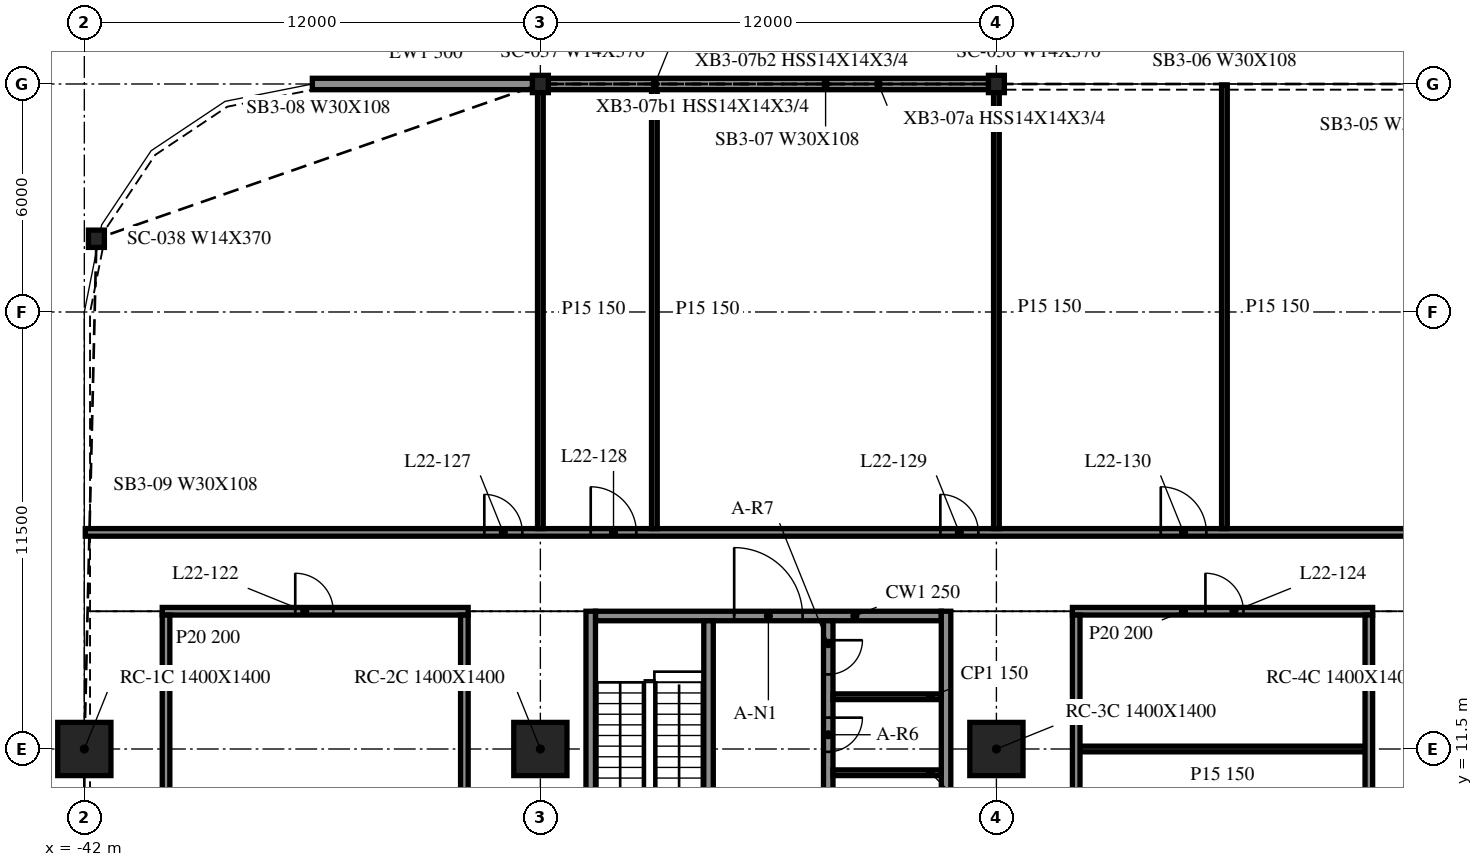
"""IFC4 building model, lengths in metres.
Left out: names, types, materials, properties, quantities, classifications, styles, units other than length and angle.
Written with IfcOpenShell. Run it as: python <this file> out.ifc"""

import sys

from ifc_helpers import new_model, si_unit, direction, frame, frame_2d, origin, origin_2d, place, context, subcontext, project, spatial, rectangle, i_section, extrude, element, fill, save


model = new_model("IFC4")
c1 = context("Model", 3, precision=1e-05, world=origin(), true_north=direction((0.0, 1.0)))
c2 = subcontext(c1, "Body", "Model", "MODEL_VIEW")
j1 = project(units=[si_unit("LENGTHUNIT", "METRE"), si_unit("PLANEANGLEUNIT", "RADIAN")], contexts=[c1])
p1 = place(None, origin())
s1 = spatial("IfcSite", under=j1, at=p1, CompositionType="ELEMENT")
p2 = place(p1, origin())
s2 = spatial("IfcBuilding", under=s1, at=p2, CompositionType="ELEMENT")
p3 = place(p2, frame((0.0, 0.0, 97.1)))
s3 = spatial("IfcBuildingStorey", under=s2, at=p3, CompositionType="ELEMENT", Elevation=97.1)
for number, where, z_axis, x_axis in (
    (1, (-42.0, 11.5, -0.34), (0.0, 0.0, 1.0), (1.0, 0.0, 0.0)),
    (2, (-30.0, 11.5, -0.34), (0.0, 0.0, 1.0), (1.0, 0.0, 0.0)),
    (3, (-18.0, 11.5, -0.34), (0.0, 0.0, 1.0), (1.0, 0.0, 0.0)),
):
    element("IfcColumn", number, at=place(p3, frame(where, z_axis=z_axis, x_axis=x_axis)), inside=s3, PredefinedType="COLUMN", context=c2, shape_type="SweptSolid", body=[
        extrude(rectangle(XDim=1.4, YDim=1.4, at=origin_2d()), origin(), (0.0, 0.0, 1.0), 4.1),
    ])
for number, where, z_axis, x_axis in (
    (4, (-18.0, 29.0, -0.34), (0.0, 0.0, 1.0), (1.0, 0.0, 0.0)),
    (5, (-30.0, 29.0, -0.34), (0.0, 0.0, 1.0), (1.0, 0.0, 0.0)),
    (6, (-41.682, 24.927, -0.34), (0.0, 0.0, 1.0), (1.0, 0.0, 0.0)),
):
    element("IfcColumn", number, at=place(p3, frame(where, z_axis=z_axis, x_axis=x_axis)), inside=s3, PredefinedType="COLUMN", context=c2, shape_type="SweptSolid", body=[
        extrude(i_section(OverallWidth=0.419, OverallDepth=0.455, WebThickness=0.042, FlangeThickness=0.068, at=origin_2d()), origin(), (0.0, 0.0, 1.0), 4.1),
    ])
p4 = place(p3, frame((-18.021, 29.0, 0.0), z_axis=(0.0, 0.0, 1.0), x_axis=(-1.0, 0.0, 0.0)))
e7 = element("IfcWall", 7, at=p4, inside=s3, PredefinedType="NOTDEFINED", context=c2, shape_type="SweptSolid", body=[
    extrude(rectangle(XDim=11.958, YDim=0.3, at=frame_2d((5.979, 0.0))), origin(), (0.0, 0.0, 1.0), 3.003),
])
p5 = place(p3, frame((-30.021, 29.0, 0.0), z_axis=(0.0, 0.0, 1.0), x_axis=(-1.0, 0.0, 0.0)))
e8 = element("IfcWall", 8, at=p5, inside=s3, PredefinedType="NOTDEFINED", context=c2, shape_type="SweptSolid", body=[
    extrude(rectangle(XDim=5.979, YDim=0.3, at=frame_2d((2.99, 0.0))), origin(), (0.0, 0.0, 1.0), 3.003),
])
for number, where, z_axis, x_axis in (
    (9, (-28.675, 15.125, 0.0), (0.0, 0.0, 1.0), (0.0, -1.0, 0.0)),
    (10, (-19.325, -9.125, 0.0), (0.0, 0.0, 1.0), (0.0, 1.0, 0.0)),
):
    element("IfcWall", number, at=place(p3, frame(where, z_axis=z_axis, x_axis=x_axis)), inside=s3, PredefinedType="SOLIDWALL", context=c2, shape_type="SweptSolid", body=[
        extrude(rectangle(XDim=24.25, YDim=0.25, at=frame_2d((12.125, 0.0))), origin(), (0.0, 0.0, 1.0), 3.76),
    ])
p6 = place(p3, frame((-28.55, 15.0, 0.0), z_axis=(0.0, 0.0, 1.0), x_axis=(1.0, 0.0, 0.0)))
e11 = element("IfcWall", 11, at=p6, inside=s3, PredefinedType="SOLIDWALL", context=c2, shape_type="SweptSolid", body=[
    extrude(rectangle(XDim=9.1, YDim=0.25, at=frame_2d((4.55, 0.0))), origin(), (0.0, 0.0, 1.0), 3.76),
])
p7 = place(p6, frame((3.65, 0.0, 0.0)))
e12 = element("IfcOpeningElement", 12, at=p7, cuts=e11, PredefinedType="OPENING", context=c2, shape_type="SweptSolid", body=[
    extrude(rectangle(XDim=1.8, YDim=2.1, at=frame_2d((0.9, 1.05))), frame((0.0, 0.135, 0.0), z_axis=(0.0, -1.0, 0.0), x_axis=(1.0, 0.0, 0.0)), (0.0, 0.0, 1.0), 0.27),
])
p8 = place(p3, frame((-25.575, 14.875, 0.0), z_axis=(0.0, 0.0, 1.0), x_axis=(0.0, -1.0, 0.0)))
e13 = element("IfcWall", 13, at=p8, inside=s3, PredefinedType="SOLIDWALL", context=c2, shape_type="SweptSolid", body=[
    extrude(rectangle(XDim=6.25, YDim=0.25, at=frame_2d((3.125, 0.0))), origin(), (0.0, 0.0, 1.0), 3.76),
])
p9 = place(p8, frame((4.85, 0.0, 0.0)))
e14 = element("IfcOpeningElement", 14, at=p9, cuts=e13, PredefinedType="OPENING", context=c2, shape_type="SweptSolid", body=[
    extrude(rectangle(XDim=1.0, YDim=2.1, at=frame_2d((0.5, 1.05))), frame((0.0, 0.135, 0.0), z_axis=(0.0, -1.0, 0.0), x_axis=(1.0, 0.0, 0.0)), (0.0, 0.0, 1.0), 0.27),
])
p10 = place(p3, frame((-22.425, 14.875, 0.0), z_axis=(0.0, 0.0, 1.0), x_axis=(0.0, -1.0, 0.0)))
e15 = element("IfcWall", 15, at=p10, inside=s3, PredefinedType="SOLIDWALL", context=c2, shape_type="SweptSolid", body=[
    extrude(rectangle(XDim=23.75, YDim=0.25, at=frame_2d((11.875, 0.0))), origin(), (0.0, 0.0, 1.0), 3.76),
])
p11 = place(p10, frame((15.45, 0.0, 0.0)))
e16 = element("IfcOpeningElement", 16, at=p11, cuts=e15, PredefinedType="OPENING", context=c2, shape_type="SweptSolid", body=[
    extrude(rectangle(XDim=1.1, YDim=2.1, at=frame_2d((0.55, 1.05))), frame((0.0, 0.135, 0.0), z_axis=(0.0, -1.0, 0.0), x_axis=(1.0, 0.0, 0.0)), (0.0, 0.0, 1.0), 0.27),
])
p12 = place(p10, frame((12.7, 0.0, 0.0)))
e17 = element("IfcOpeningElement", 17, at=p12, cuts=e15, PredefinedType="OPENING", context=c2, shape_type="SweptSolid", body=[
    extrude(rectangle(XDim=1.1, YDim=2.1, at=frame_2d((0.55, 1.05))), frame((0.0, 0.135, 0.0), z_axis=(0.0, -1.0, 0.0), x_axis=(1.0, 0.0, 0.0)), (0.0, 0.0, 1.0), 0.27),
])
p13 = place(p10, frame((21.837, 0.0, 0.0)))
e18 = element("IfcOpeningElement", 18, at=p13, cuts=e15, PredefinedType="OPENING", context=c2, shape_type="SweptSolid", body=[
    extrude(rectangle(XDim=0.9, YDim=2.1, at=frame_2d((0.45, 1.05))), frame((0.0, 0.135, 0.0), z_axis=(0.0, -1.0, 0.0), x_axis=(1.0, 0.0, 0.0)), (0.0, 0.0, 1.0), 0.27),
])
p14 = place(p10, frame((18.762, 0.0, 0.0)))
e19 = element("IfcOpeningElement", 19, at=p14, cuts=e15, PredefinedType="OPENING", context=c2, shape_type="SweptSolid", body=[
    extrude(rectangle(XDim=0.9, YDim=2.1, at=frame_2d((0.45, 1.05))), frame((0.0, 0.135, 0.0), z_axis=(0.0, -1.0, 0.0), x_axis=(1.0, 0.0, 0.0)), (0.0, 0.0, 1.0), 0.27),
])
p15 = place(p10, frame((4.587, 0.0, 0.0)))
e20 = element("IfcOpeningElement", 20, at=p15, cuts=e15, PredefinedType="OPENING", context=c2, shape_type="SweptSolid", body=[
    extrude(rectangle(XDim=0.9, YDim=2.1, at=frame_2d((0.45, 1.05))), frame((0.0, 0.135, 0.0), z_axis=(0.0, -1.0, 0.0), x_axis=(1.0, 0.0, 0.0)), (0.0, 0.0, 1.0), 0.27),
])
p16 = place(p10, frame((2.55, 0.0, 0.0)))
e21 = element("IfcOpeningElement", 21, at=p16, cuts=e15, PredefinedType="OPENING", context=c2, shape_type="SweptSolid", body=[
    extrude(rectangle(XDim=0.9, YDim=2.1, at=frame_2d((0.45, 1.05))), frame((0.0, 0.135, 0.0), z_axis=(0.0, -1.0, 0.0), x_axis=(1.0, 0.0, 0.0)), (0.0, 0.0, 1.0), 0.27),
])
p17 = place(p10, frame((0.512, 0.0, 0.0)))
e22 = element("IfcOpeningElement", 22, at=p17, cuts=e15, PredefinedType="OPENING", context=c2, shape_type="SweptSolid", body=[
    extrude(rectangle(XDim=0.9, YDim=2.1, at=frame_2d((0.45, 1.05))), frame((0.0, 0.135, 0.0), z_axis=(0.0, -1.0, 0.0), x_axis=(1.0, 0.0, 0.0)), (0.0, 0.0, 1.0), 0.27),
])
for number, where, z_axis, x_axis in (
    (23, (-22.3, 10.875, 0.0), (0.0, 0.0, 1.0), (1.0, 0.0, 0.0)),
    (24, (-22.3, 12.875, 0.0), (0.0, 0.0, 1.0), (1.0, 0.0, 0.0)),
):
    element("IfcWall", number, at=place(p3, frame(where, z_axis=z_axis, x_axis=x_axis)), inside=s3, PredefinedType="PARTITIONING", context=c2, shape_type="SweptSolid", body=[
        extrude(rectangle(XDim=2.85, YDim=0.15, at=frame_2d((1.425, 0.0))), origin(), (0.0, 0.0, 1.0), 3.76),
    ])
p18 = place(p3, frame((-15.8, 11.5, 0.0), z_axis=(0.0, 0.0, 1.0), x_axis=(1.0, 0.0, 0.0)))
e25 = element("IfcWall", 25, at=p18, inside=s3, PredefinedType="PARTITIONING", context=c2, shape_type="SweptSolid", body=[
    extrude(rectangle(XDim=7.5, YDim=0.15, at=frame_2d((3.75, 0.0))), origin(), (0.0, 0.0, 1.0), 3.76),
])
p19 = place(p3, frame((-39.95, 15.125, 0.0), z_axis=(0.0, 0.0, 1.0), x_axis=(1.0, 0.0, 0.0)))
e26 = element("IfcWall", 26, at=p19, inside=s3, PredefinedType="PARTITIONING", context=c2, shape_type="SweptSolid", body=[
    extrude(rectangle(XDim=8.05, YDim=0.2, at=frame_2d((4.025, 0.0))), origin(), (0.0, 0.0, 1.0), 3.76),
])
p20 = place(p19, frame((3.5, 0.0, 0.0)))
e27 = element("IfcOpeningElement", 27, at=p20, cuts=e26, PredefinedType="OPENING", context=c2, shape_type="SweptSolid", body=[
    extrude(rectangle(XDim=1.0, YDim=2.1, at=frame_2d((0.5, 1.05))), frame((0.0, 0.11, 0.0), z_axis=(0.0, -1.0, 0.0), x_axis=(1.0, 0.0, 0.0)), (0.0, 0.0, 1.0), 0.22),
])
p21 = place(p3, frame((-16.0, 15.125, 0.0), z_axis=(0.0, 0.0, 1.0), x_axis=(1.0, 0.0, 0.0)))
e28 = element("IfcWall", 28, at=p21, inside=s3, PredefinedType="PARTITIONING", context=c2, shape_type="SweptSolid", body=[
    extrude(rectangle(XDim=7.9, YDim=0.2, at=frame_2d((3.95, 0.0))), origin(), (0.0, 0.0, 1.0), 3.76),
])
p22 = place(p21, frame((3.5, 0.0, 0.0)))
e29 = element("IfcOpeningElement", 29, at=p22, cuts=e28, PredefinedType="OPENING", context=c2, shape_type="SweptSolid", body=[
    extrude(rectangle(XDim=1.0, YDim=2.1, at=frame_2d((0.5, 1.05))), frame((0.0, 0.11, 0.0), z_axis=(0.0, -1.0, 0.0), x_axis=(1.0, 0.0, 0.0)), (0.0, 0.0, 1.0), 0.22),
])
p23 = place(p3, frame((-41.975, 17.2, 0.0), z_axis=(0.0, 0.0, 1.0), x_axis=(1.0, 0.0, 0.0)))
e30 = element("IfcWall", 30, at=p23, inside=s3, PredefinedType="PARTITIONING", context=c2, shape_type="SweptSolid", body=[
    extrude(rectangle(XDim=95.95, YDim=0.2, at=frame_2d((47.975, 0.0))), origin(), (0.0, 0.0, 1.0), 3.76),
])
p24 = place(p23, frame((10.5, 0.0, 0.0)))
e31 = element("IfcOpeningElement", 31, at=p24, cuts=e30, PredefinedType="OPENING", context=c2, shape_type="SweptSolid", body=[
    extrude(rectangle(XDim=1.0, YDim=2.1, at=frame_2d((0.5, 1.05))), frame((0.0, 0.11, 0.0), z_axis=(0.0, -1.0, 0.0), x_axis=(1.0, 0.0, 0.0)), (0.0, 0.0, 1.0), 0.22),
])
p25 = place(p23, frame((13.3, 0.0, 0.0)))
e32 = element("IfcOpeningElement", 32, at=p25, cuts=e30, PredefinedType="OPENING", context=c2, shape_type="SweptSolid", body=[
    extrude(rectangle(XDim=1.2, YDim=2.1, at=frame_2d((0.6, 1.05))), frame((0.0, 0.11, 0.0), z_axis=(0.0, -1.0, 0.0), x_axis=(1.0, 0.0, 0.0)), (0.0, 0.0, 1.0), 0.22),
])
p26 = place(p23, frame((22.5, 0.0, 0.0)))
e33 = element("IfcOpeningElement", 33, at=p26, cuts=e30, PredefinedType="OPENING", context=c2, shape_type="SweptSolid", body=[
    extrude(rectangle(XDim=1.0, YDim=2.1, at=frame_2d((0.5, 1.05))), frame((0.0, 0.11, 0.0), z_axis=(0.0, -1.0, 0.0), x_axis=(1.0, 0.0, 0.0)), (0.0, 0.0, 1.0), 0.22),
])
p27 = place(p23, frame((28.3, 0.0, 0.0)))
e34 = element("IfcOpeningElement", 34, at=p27, cuts=e30, PredefinedType="OPENING", context=c2, shape_type="SweptSolid", body=[
    extrude(rectangle(XDim=1.2, YDim=2.1, at=frame_2d((0.6, 1.05))), frame((0.0, 0.11, 0.0), z_axis=(0.0, -1.0, 0.0), x_axis=(1.0, 0.0, 0.0)), (0.0, 0.0, 1.0), 0.22),
])
p28 = place(p23, frame((40.5, 0.0, 0.0)))
e35 = element("IfcOpeningElement", 35, at=p28, cuts=e30, PredefinedType="OPENING", context=c2, shape_type="SweptSolid", body=[
    extrude(rectangle(XDim=1.0, YDim=2.1, at=frame_2d((0.5, 1.05))), frame((0.0, 0.11, 0.0), z_axis=(0.0, -1.0, 0.0), x_axis=(1.0, 0.0, 0.0)), (0.0, 0.0, 1.0), 0.22),
])
p29 = place(p23, frame((43.3, 0.0, 0.0)))
e36 = element("IfcOpeningElement", 36, at=p29, cuts=e30, PredefinedType="OPENING", context=c2, shape_type="SweptSolid", body=[
    extrude(rectangle(XDim=1.2, YDim=2.1, at=frame_2d((0.6, 1.05))), frame((0.0, 0.11, 0.0), z_axis=(0.0, -1.0, 0.0), x_axis=(1.0, 0.0, 0.0)), (0.0, 0.0, 1.0), 0.22),
])
p30 = place(p23, frame((47.3, 0.0, 0.0)))
e37 = element("IfcOpeningElement", 37, at=p30, cuts=e30, PredefinedType="OPENING", context=c2, shape_type="SweptSolid", body=[
    extrude(rectangle(XDim=1.0, YDim=2.1, at=frame_2d((0.5, 1.05))), frame((0.0, 0.11, 0.0), z_axis=(0.0, -1.0, 0.0), x_axis=(1.0, 0.0, 0.0)), (0.0, 0.0, 1.0), 0.22),
])
p31 = place(p23, frame((54.1, 0.0, 0.0)))
e38 = element("IfcOpeningElement", 38, at=p31, cuts=e30, PredefinedType="OPENING", context=c2, shape_type="SweptSolid", body=[
    extrude(rectangle(XDim=1.2, YDim=2.1, at=frame_2d((0.6, 1.05))), frame((0.0, 0.11, 0.0), z_axis=(0.0, -1.0, 0.0), x_axis=(1.0, 0.0, 0.0)), (0.0, 0.0, 1.0), 0.22),
])
p32 = place(p23, frame((60.1, 0.0, 0.0)))
e39 = element("IfcOpeningElement", 39, at=p32, cuts=e30, PredefinedType="OPENING", context=c2, shape_type="SweptSolid", body=[
    extrude(rectangle(XDim=1.0, YDim=2.1, at=frame_2d((0.5, 1.05))), frame((0.0, 0.11, 0.0), z_axis=(0.0, -1.0, 0.0), x_axis=(1.0, 0.0, 0.0)), (0.0, 0.0, 1.0), 0.22),
])
p33 = place(p23, frame((72.1, 0.0, 0.0)))
e40 = element("IfcOpeningElement", 40, at=p33, cuts=e30, PredefinedType="OPENING", context=c2, shape_type="SweptSolid", body=[
    extrude(rectangle(XDim=1.2, YDim=2.1, at=frame_2d((0.6, 1.05))), frame((0.0, 0.11, 0.0), z_axis=(0.0, -1.0, 0.0), x_axis=(1.0, 0.0, 0.0)), (0.0, 0.0, 1.0), 0.22),
])
p34 = place(p23, frame((75.1, 0.0, 0.0)))
e41 = element("IfcOpeningElement", 41, at=p34, cuts=e30, PredefinedType="OPENING", context=c2, shape_type="SweptSolid", body=[
    extrude(rectangle(XDim=1.0, YDim=2.1, at=frame_2d((0.5, 1.05))), frame((0.0, 0.11, 0.0), z_axis=(0.0, -1.0, 0.0), x_axis=(1.0, 0.0, 0.0)), (0.0, 0.0, 1.0), 0.22),
])
p35 = place(p23, frame((84.1, 0.0, 0.0)))
e42 = element("IfcOpeningElement", 42, at=p35, cuts=e30, PredefinedType="OPENING", context=c2, shape_type="SweptSolid", body=[
    extrude(rectangle(XDim=1.2, YDim=2.1, at=frame_2d((0.6, 1.05))), frame((0.0, 0.11, 0.0), z_axis=(0.0, -1.0, 0.0), x_axis=(1.0, 0.0, 0.0)), (0.0, 0.0, 1.0), 0.22),
])
p36 = place(p23, frame((90.1, 0.0, 0.0)))
e43 = element("IfcOpeningElement", 43, at=p36, cuts=e30, PredefinedType="OPENING", context=c2, shape_type="SweptSolid", body=[
    extrude(rectangle(XDim=1.0, YDim=2.1, at=frame_2d((0.5, 1.05))), frame((0.0, 0.11, 0.0), z_axis=(0.0, -1.0, 0.0), x_axis=(1.0, 0.0, 0.0)), (0.0, 0.0, 1.0), 0.22),
])
for number, where, z_axis, x_axis in (
    (44, (-39.85, -9.025, 0.0), (0.0, 0.0, 1.0), (0.0, 1.0, 0.0)),
    (45, (-32.0, -9.025, 0.0), (0.0, 0.0, 1.0), (0.0, 1.0, 0.0)),
):
    element("IfcWall", number, at=place(p3, frame(where, z_axis=z_axis, x_axis=x_axis)), inside=s3, PredefinedType="PARTITIONING", context=c2, shape_type="SweptSolid", body=[
        extrude(rectangle(XDim=24.05, YDim=0.2, at=frame_2d((12.025, 0.0))), origin(), (0.0, 0.0, 1.0), 3.76),
    ])
for number, where, z_axis, x_axis in (
    (46, (-30.0, 17.3, 0.0), (0.0, 0.0, 1.0), (0.0, 1.0, 0.0)),
    (47, (-27.0, 17.3, 0.0), (0.0, 0.0, 1.0), (0.0, 1.0, 0.0)),
):
    element("IfcWall", number, at=place(p3, frame(where, z_axis=z_axis, x_axis=x_axis)), inside=s3, PredefinedType="PARTITIONING", context=c2, shape_type="SweptSolid", body=[
        extrude(rectangle(XDim=11.55, YDim=0.15, at=frame_2d((5.775, 0.0))), origin(), (0.0, 0.0, 1.0), 3.76),
    ])
p37 = place(p3, frame((-18.0, 17.3, 0.0), z_axis=(0.0, 0.0, 1.0), x_axis=(0.0, 1.0, 0.0)))
e48 = element("IfcWall", 48, at=p37, inside=s3, PredefinedType="PARTITIONING", context=c2, shape_type="SweptSolid", body=[
    extrude(rectangle(XDim=11.675, YDim=0.15, at=frame_2d((5.837, 0.0))), origin(), (0.0, 0.0, 1.0), 3.76),
])
p38 = place(p3, frame((-15.9, -9.025, 0.0), z_axis=(0.0, 0.0, 1.0), x_axis=(0.0, 1.0, 0.0)))
e49 = element("IfcWall", 49, at=p38, inside=s3, PredefinedType="PARTITIONING", context=c2, shape_type="SweptSolid", body=[
    extrude(rectangle(XDim=24.05, YDim=0.2, at=frame_2d((12.025, 0.0))), origin(), (0.0, 0.0, 1.0), 3.76),
])
p39 = place(p38, frame((11.5, 0.0, 0.0)))
e50 = element("IfcOpeningElement", 50, at=p39, cuts=e49, PredefinedType="OPENING", context=c2, shape_type="SweptSolid", body=[
    extrude(rectangle(XDim=0.9, YDim=2.1, at=frame_2d((0.45, 1.05))), frame((0.0, 0.11, 0.0), z_axis=(0.0, -1.0, 0.0), x_axis=(1.0, 0.0, 0.0)), (0.0, 0.0, 1.0), 0.22),
])
p40 = place(p3, frame((-12.0, 17.3, 0.0), z_axis=(0.0, 0.0, 1.0), x_axis=(0.0, 1.0, 0.0)))
e51 = element("IfcWall", 51, at=p40, inside=s3, PredefinedType="PARTITIONING", context=c2, shape_type="SweptSolid", body=[
    extrude(rectangle(XDim=11.675, YDim=0.15, at=frame_2d((5.837, 0.0))), origin(), (0.0, 0.0, 1.0), 3.76),
])
p41 = place(p3, frame((-8.2, -9.025, 0.0), z_axis=(0.0, 0.0, 1.0), x_axis=(0.0, 1.0, 0.0)))
e52 = element("IfcWall", 52, at=p41, inside=s3, PredefinedType="PARTITIONING", context=c2, shape_type="SweptSolid", body=[
    extrude(rectangle(XDim=24.05, YDim=0.2, at=frame_2d((12.025, 0.0))), origin(), (0.0, 0.0, 1.0), 3.76),
])
p42 = place(p7, origin())
e53 = element("IfcDoor", 53, at=p42, inside=s3, OperationType="DOUBLE_DOOR_SINGLE_SWING", PredefinedType="DOOR", context=c2, shape_type="SweptSolid", body=[
    extrude(rectangle(XDim=1.8, YDim=2.1, at=frame_2d((0.9, 1.05))), frame((0.0, 0.025, 0.0), z_axis=(0.0, -1.0, 0.0), x_axis=(1.0, 0.0, 0.0)), (0.0, 0.0, 1.0), 0.05),
])
fill(e12, e53)
p43 = place(p16, origin())
e54 = element("IfcDoor", 54, at=p43, inside=s3, OperationType="SINGLE_SWING_RIGHT", PredefinedType="DOOR", context=c2, shape_type="SweptSolid", body=[
    extrude(rectangle(XDim=0.9, YDim=2.1, at=frame_2d((0.45, 1.05))), frame((0.0, 0.025, 0.0), z_axis=(0.0, -1.0, 0.0), x_axis=(1.0, 0.0, 0.0)), (0.0, 0.0, 1.0), 0.05),
])
fill(e21, e54)
p44 = place(p17, origin())
e55 = element("IfcDoor", 55, at=p44, inside=s3, OperationType="SINGLE_SWING_LEFT", PredefinedType="DOOR", context=c2, shape_type="SweptSolid", body=[
    extrude(rectangle(XDim=0.9, YDim=2.1, at=frame_2d((0.45, 1.05))), frame((0.0, 0.025, 0.0), z_axis=(0.0, -1.0, 0.0), x_axis=(1.0, 0.0, 0.0)), (0.0, 0.0, 1.0), 0.05),
])
fill(e22, e55)
p45 = place(p20, origin())
e56 = element("IfcDoor", 56, at=p45, inside=s3, OperationType="SINGLE_SWING_RIGHT", PredefinedType="DOOR", context=c2, shape_type="SweptSolid", body=[
    extrude(rectangle(XDim=1.0, YDim=2.1, at=frame_2d((0.5, 1.05))), frame((0.0, 0.025, 0.0), z_axis=(0.0, -1.0, 0.0), x_axis=(1.0, 0.0, 0.0)), (0.0, 0.0, 1.0), 0.05),
])
fill(e27, e56)
p46 = place(p22, origin())
e57 = element("IfcDoor", 57, at=p46, inside=s3, OperationType="SINGLE_SWING_LEFT", PredefinedType="DOOR", context=c2, shape_type="SweptSolid", body=[
    extrude(rectangle(XDim=1.0, YDim=2.1, at=frame_2d((0.5, 1.05))), frame((0.0, 0.025, 0.0), z_axis=(0.0, -1.0, 0.0), x_axis=(1.0, 0.0, 0.0)), (0.0, 0.0, 1.0), 0.05),
])
fill(e29, e57)
p47 = place(p24, origin())
e58 = element("IfcDoor", 58, at=p47, inside=s3, OperationType="SINGLE_SWING_LEFT", PredefinedType="DOOR", context=c2, shape_type="SweptSolid", body=[
    extrude(rectangle(XDim=1.0, YDim=2.1, at=frame_2d((0.5, 1.05))), frame((0.0, 0.025, 0.0), z_axis=(0.0, -1.0, 0.0), x_axis=(1.0, 0.0, 0.0)), (0.0, 0.0, 1.0), 0.05),
])
fill(e31, e58)
p48 = place(p25, origin())
e59 = element("IfcDoor", 59, at=p48, inside=s3, OperationType="SINGLE_SWING_LEFT", PredefinedType="DOOR", context=c2, shape_type="SweptSolid", body=[
    extrude(rectangle(XDim=1.2, YDim=2.1, at=frame_2d((0.6, 1.05))), frame((0.0, 0.025, 0.0), z_axis=(0.0, -1.0, 0.0), x_axis=(1.0, 0.0, 0.0)), (0.0, 0.0, 1.0), 0.05),
])
fill(e32, e59)
p49 = place(p26, origin())
e60 = element("IfcDoor", 60, at=p49, inside=s3, OperationType="SINGLE_SWING_LEFT", PredefinedType="DOOR", context=c2, shape_type="SweptSolid", body=[
    extrude(rectangle(XDim=1.0, YDim=2.1, at=frame_2d((0.5, 1.05))), frame((0.0, 0.025, 0.0), z_axis=(0.0, -1.0, 0.0), x_axis=(1.0, 0.0, 0.0)), (0.0, 0.0, 1.0), 0.05),
])
fill(e33, e60)
p50 = place(p27, origin())
e61 = element("IfcDoor", 61, at=p50, inside=s3, OperationType="SINGLE_SWING_LEFT", PredefinedType="DOOR", context=c2, shape_type="SweptSolid", body=[
    extrude(rectangle(XDim=1.2, YDim=2.1, at=frame_2d((0.6, 1.05))), frame((0.0, 0.025, 0.0), z_axis=(0.0, -1.0, 0.0), x_axis=(1.0, 0.0, 0.0)), (0.0, 0.0, 1.0), 0.05),
])
fill(e34, e61)
save(model, sys.argv[1])
